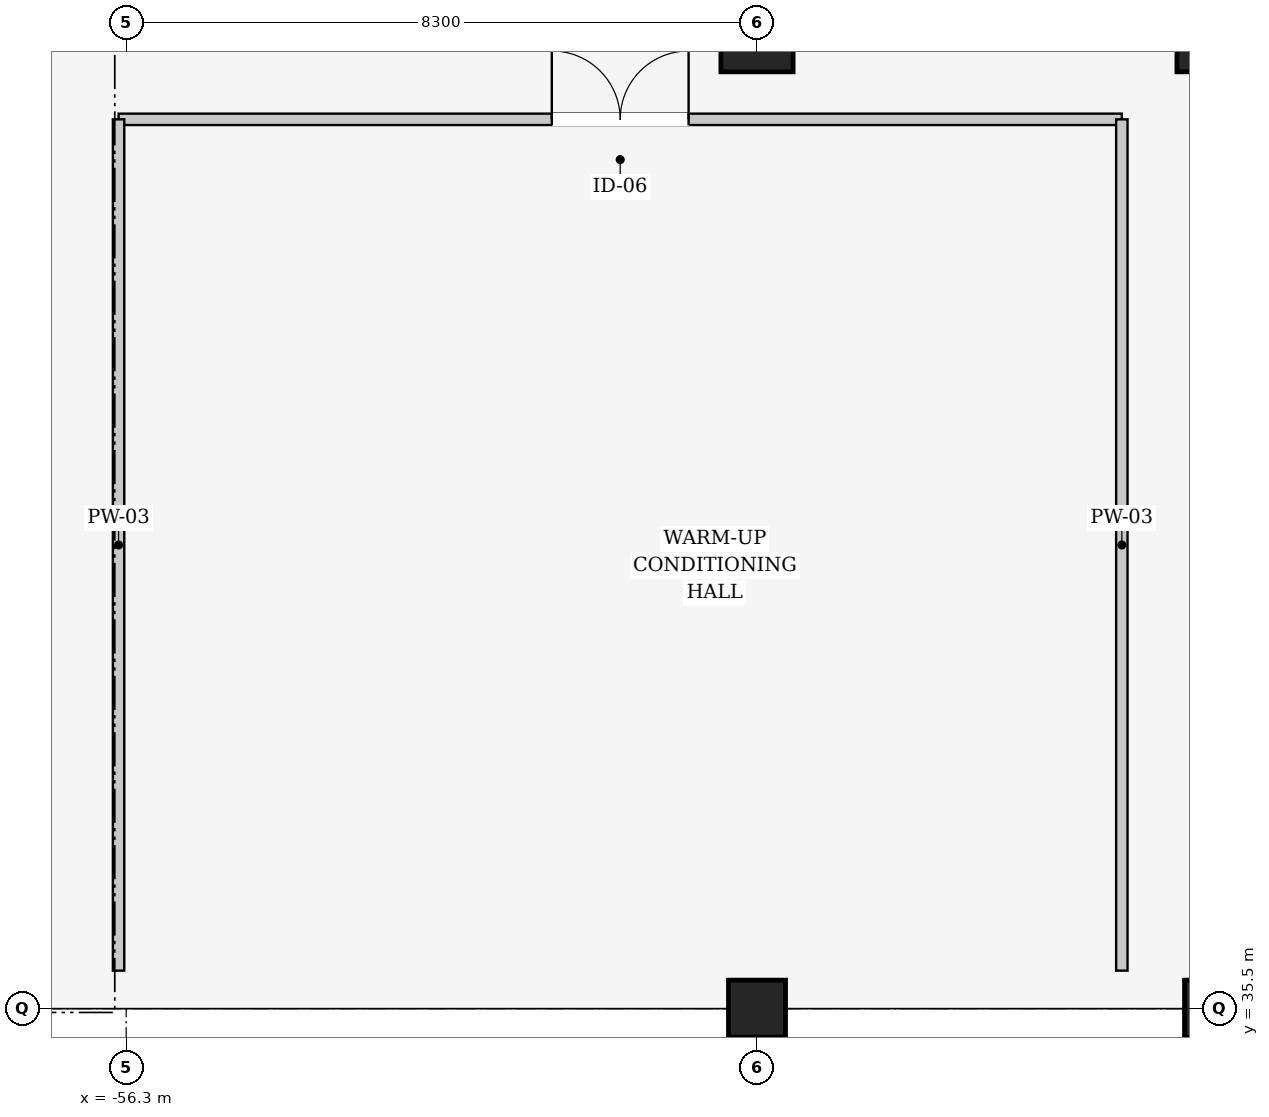
"""IFC4 building model, lengths in metres.
Left out: names, types, materials, properties, quantities, classifications, styles, units other than length and angle.
Written with IfcOpenShell. Run it as: python <this file> out.ifc"""

import sys

from ifc_helpers import new_model, si_unit, direction, frame, frame_2d, origin, origin_2d, place, context, subcontext, project, spatial, rectangle, extrude, element, fill, save


model = new_model("IFC4")
c1 = context("Model", 3, precision=1e-05, world=origin(), true_north=direction((0.0, 1.0)))
c2 = subcontext(c1, "Body", "Model", "MODEL_VIEW")
j1 = project(units=[si_unit("LENGTHUNIT", "METRE"), si_unit("PLANEANGLEUNIT", "RADIAN")], contexts=[c1])
p1 = place(None, origin())
s1 = spatial("IfcSite", under=j1, at=p1, CompositionType="ELEMENT")
p2 = place(p1, origin())
s2 = spatial("IfcBuilding", under=s1, at=p2, CompositionType="ELEMENT")
p3 = place(p2, origin())
s3 = spatial("IfcBuildingStorey", under=s2, at=p3, CompositionType="ELEMENT", Elevation=0.0)
p4 = place(p3, frame((-48.0, 35.5, 0.0), z_axis=(0.0, 0.0, 1.0), x_axis=(1.0, 0.0, 0.0)))
e1 = element("IfcColumn", 1, at=p4, inside=s3, PredefinedType="COLUMN", context=c2, shape_type="SweptSolid", body=[
    extrude(rectangle(XDim=0.75, YDim=0.75, at=origin_2d()), origin(), (0.0, 0.0, 1.0), 6.0),
])
p5 = place(p3, frame((-48.0, 48.3, 0.0), z_axis=(0.0, 0.0, 1.0), x_axis=(1.0, 0.0, 0.0)))
e2 = element("IfcColumn", 2, at=p5, inside=s3, PredefinedType="COLUMN", context=c2, shape_type="SweptSolid", body=[
    extrude(rectangle(XDim=0.95, YDim=0.95, at=origin_2d()), origin(), (0.0, 0.0, 1.0), 6.0),
])
p6 = place(p3, frame((-42.0, 35.5, 0.0), z_axis=(0.0, 0.0, 1.0), x_axis=(1.0, 0.0, 0.0)))
e3 = element("IfcColumn", 3, at=p6, inside=s3, PredefinedType="COLUMN", context=c2, shape_type="SweptSolid", body=[
    extrude(rectangle(XDim=0.75, YDim=0.75, at=origin_2d()), origin(), (0.0, 0.0, 1.0), 6.0),
])
p7 = place(p3, frame((-42.0, 48.3, 0.0), z_axis=(0.0, 0.0, 1.0), x_axis=(1.0, 0.0, 0.0)))
e4 = element("IfcColumn", 4, at=p7, inside=s3, PredefinedType="COLUMN", context=c2, shape_type="SweptSolid", body=[
    extrude(rectangle(XDim=0.95, YDim=0.95, at=origin_2d()), origin(), (0.0, 0.0, 1.0), 6.0),
])
p8 = place(p3, frame((-56.4, 47.2, 0.0), z_axis=(0.0, 0.0, 1.0), x_axis=(1.0, 0.0, 0.0)))
e5 = element("IfcWall", 5, at=p8, inside=s3, PredefinedType="PARTITIONING", context=c2, shape_type="SweptSolid", body=[
    extrude(rectangle(XDim=13.2, YDim=0.15, at=frame_2d((6.6, 0.0))), origin(), (0.0, 0.0, 1.0), 5.142),
])
p9 = place(p8, frame((5.7, 0.0, 0.0)))
e6 = element("IfcOpeningElement", 6, at=p9, cuts=e5, PredefinedType="OPENING", context=c2, shape_type="SweptSolid", body=[
    extrude(rectangle(XDim=1.8, YDim=2.2, at=frame_2d((0.9, 1.1))), frame((0.0, 0.085, 0.0), z_axis=(0.0, -1.0, 0.0), x_axis=(1.0, 0.0, 0.0)), (0.0, 0.0, 1.0), 0.17),
])
p10 = place(p3, frame((-43.2, 47.2, 0.0), z_axis=(0.0, 0.0, 1.0), x_axis=(0.0, -1.0, 0.0)))
e7 = element("IfcWall", 7, at=p10, inside=s3, PredefinedType="PARTITIONING", context=c2, shape_type="SweptSolid", body=[
    extrude(rectangle(XDim=11.2, YDim=0.15, at=frame_2d((5.6, 0.0))), origin(), (0.0, 0.0, 1.0), 5.32),
])
p11 = place(p3, frame((-56.4, 36.0, 0.0), z_axis=(0.0, 0.0, 1.0), x_axis=(0.0, 1.0, 0.0)))
e8 = element("IfcWall", 8, at=p11, inside=s3, PredefinedType="PARTITIONING", context=c2, shape_type="SweptSolid", body=[
    extrude(rectangle(XDim=11.2, YDim=0.15, at=frame_2d((5.6, 0.0))), origin(), (0.0, 0.0, 1.0), 4.725),
])
p12 = place(p9, origin())
e9 = element("IfcDoor", 9, at=p12, inside=s3, OperationType="DOUBLE_DOOR_SINGLE_SWING", PredefinedType="DOOR", context=c2, shape_type="SweptSolid", body=[
    extrude(rectangle(XDim=1.8, YDim=2.2, at=frame_2d((0.9, 1.1))), frame((0.0, 0.025, 0.0), z_axis=(0.0, -1.0, 0.0), x_axis=(1.0, 0.0, 0.0)), (0.0, 0.0, 1.0), 0.05),
])
fill(e6, e9)
save(model, sys.argv[1])
